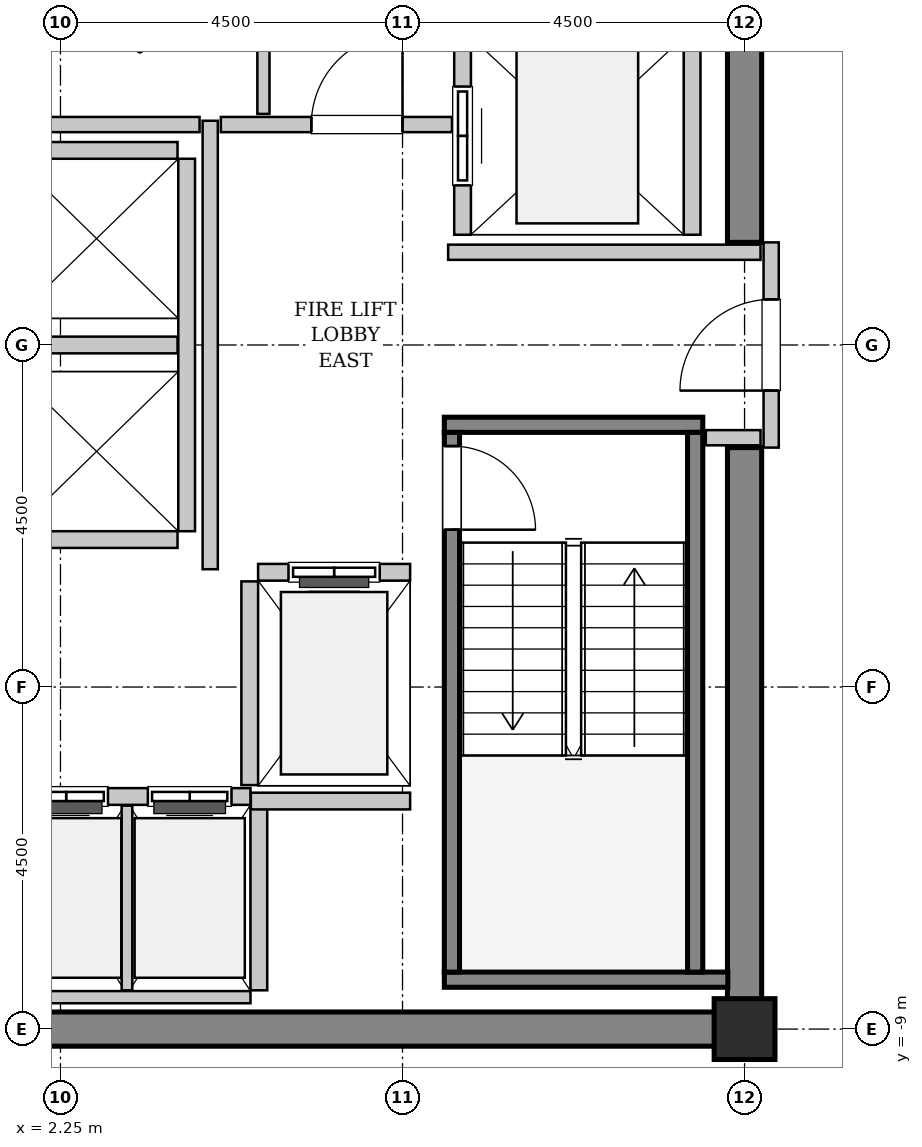
"""IFC4 building model, lengths in metres.
Left out: names, types, materials, properties, quantities, classifications, styles, units other than length and angle.
Written with IfcOpenShell. Run it as: python <this file> out.ifc"""

import sys

from ifc_helpers import new_model, si_unit, direction, frame, frame_2d, origin, origin_2d, place, context, subcontext, project, spatial, rectangle, hollow_rectangle, extrude, source, transform, mapped, element, fill, save


model = new_model("IFC4")
c1 = context("Model", 3, precision=1e-05, world=origin(), true_north=direction((0.0, 1.0)))
c2 = subcontext(c1, "Body", "Model", "MODEL_VIEW")
j1 = project(units=[si_unit("LENGTHUNIT", "METRE"), si_unit("PLANEANGLEUNIT", "RADIAN")], contexts=[c1])
p1 = place(None, origin())
s1 = spatial("IfcSite", under=j1, at=p1, CompositionType="ELEMENT")
p2 = place(p1, origin())
s2 = spatial("IfcBuilding", under=s1, at=p2, CompositionType="ELEMENT")
p3 = place(p2, frame((0.0, 0.0, 221.8)))
s3 = spatial("IfcBuildingStorey", under=s2, at=p3, CompositionType="ELEMENT", Elevation=221.8)
m1 = source(origin(), c2, "Body", "SweptSolid", [
    extrude(rectangle(XDim=9.925, YDim=0.45, at=frame_2d((4.962, 0.0))), origin(), (0.0, 0.0, 1.0), 3.8),
])
p4 = place(p3, frame((1.55, -9.0, 0.0), z_axis=(0.0, 0.0, 1.0), x_axis=(1.0, 0.0, 0.0)))
e1 = element("IfcWall", 1, at=p4, inside=s3, PredefinedType="SHEAR", context=c2, shape_type="MappedRepresentation", body=[
    mapped(m1, transform((0.0, 0.0, 0.0), x_axis=(1.0, 0.0, 0.0), y_axis=(0.0, 1.0, 0.0), z_axis=(0.0, 0.0, 1.0), scale=1.0)),
])
m2 = source(origin(), c2, "Body", "SweptSolid", [
    extrude(rectangle(XDim=7.425, YDim=0.45, at=frame_2d((3.712, 0.0))), origin(), (0.0, 0.0, 1.0), 3.8),
])
for number, where, z_axis, x_axis in (
    (2, (11.25, -8.775, 0.0), (0.0, 0.0, 1.0), (0.0, 1.0, 0.0)),
    (3, (11.25, 1.35, 0.0), (0.0, 0.0, 1.0), (0.0, 1.0, 0.0)),
):
    element("IfcWall", number, at=place(p3, frame(where, z_axis=z_axis, x_axis=x_axis)), inside=s3, PredefinedType="SHEAR", context=c2, shape_type="MappedRepresentation", body=[
        mapped(m2, transform((0.0, 0.0, 0.0), x_axis=(1.0, 0.0, 0.0), y_axis=(0.0, 1.0, 0.0), z_axis=(0.0, 0.0, 1.0), scale=1.0)),
    ])
m3 = source(origin(), c2, "Body", "SweptSolid", [
    extrude(hollow_rectangle(XDim=0.8, YDim=0.8, WallThickness=0.04, InnerFilletRadius=0.04, OuterFilletRadius=0.08, at=origin_2d()), origin(), (0.0, 0.0, 1.0), 3.8),
])
p5 = place(p3, frame((11.25, -9.0, 0.0), z_axis=(0.0, 0.0, 1.0), x_axis=(1.0, 0.0, 0.0)))
e4 = element("IfcColumn", 4, at=p5, inside=s3, PredefinedType="COLUMN", context=c2, shape_type="MappedRepresentation", body=[
    mapped(m3, transform((0.0, 0.0, 0.0), x_axis=(1.0, 0.0, 0.0), y_axis=(0.0, 1.0, 0.0), z_axis=(0.0, 0.0, 1.0), scale=1.0)),
])
m4 = source(origin(), c2, "Body", "SweptSolid", [
    extrude(rectangle(XDim=3.4, YDim=0.2, at=frame_2d((1.7, 0.0))), origin(), (0.0, 0.0, 1.0), 3.8),
])
p6 = place(p3, frame((7.3, -1.05, 0.0), z_axis=(0.0, 0.0, 1.0), x_axis=(1.0, 0.0, 0.0)))
e5 = element("IfcWall", 5, at=p6, inside=s3, PredefinedType="SOLIDWALL", context=c2, shape_type="MappedRepresentation", body=[
    mapped(m4, transform((0.0, 0.0, 0.0), x_axis=(1.0, 0.0, 0.0), y_axis=(0.0, 1.0, 0.0), z_axis=(0.0, 0.0, 1.0), scale=1.0)),
])
m5 = source(origin(), c2, "Body", "SweptSolid", [
    extrude(rectangle(XDim=3.73, YDim=0.2, at=frame_2d((1.865, 0.0))), origin(), (0.0, 0.0, 1.0), 3.8),
])
p7 = place(p3, frame((7.3, -8.35, 0.0), z_axis=(0.0, 0.0, 1.0), x_axis=(1.0, 0.0, 0.0)))
e6 = element("IfcWall", 6, at=p7, inside=s3, PredefinedType="SOLIDWALL", context=c2, shape_type="MappedRepresentation", body=[
    mapped(m5, transform((0.0, 0.0, 0.0), x_axis=(1.0, 0.0, 0.0), y_axis=(0.0, 1.0, 0.0), z_axis=(0.0, 0.0, 1.0), scale=1.0)),
])
m6 = source(origin(), c2, "Body", "SweptSolid", [
    extrude(rectangle(XDim=7.1, YDim=0.2, at=frame_2d((3.55, 0.0))), origin(), (0.0, 0.0, 1.0), 3.8),
])
p8 = place(p3, frame((7.4, -1.15, 0.0), z_axis=(0.0, 0.0, 1.0), x_axis=(0.0, -1.0, 0.0)))
e7 = element("IfcWall", 7, at=p8, inside=s3, PredefinedType="SOLIDWALL", context=c2, shape_type="MappedRepresentation", body=[
    mapped(m6, transform((0.0, 0.0, 0.0), x_axis=(1.0, 0.0, 0.0), y_axis=(0.0, 1.0, 0.0), z_axis=(0.0, 0.0, 1.0), scale=1.0)),
])
p9 = place(p8, frame((0.18, 0.0, 0.0)))
e8 = element("IfcOpeningElement", 8, at=p9, cuts=e7, PredefinedType="OPENING", context=c2, shape_type="SweptSolid", body=[
    extrude(rectangle(XDim=1.1, YDim=2.15, at=frame_2d((0.55, 1.075))), frame((0.0, 0.11, 0.0), z_axis=(0.0, -1.0, 0.0), x_axis=(1.0, 0.0, 0.0)), (0.0, 0.0, 1.0), 0.22),
])
p10 = place(p3, frame((10.6, -1.15, 0.0), z_axis=(0.0, 0.0, 1.0), x_axis=(0.0, -1.0, 0.0)))
e9 = element("IfcWall", 9, at=p10, inside=s3, PredefinedType="SOLIDWALL", context=c2, shape_type="MappedRepresentation", body=[
    mapped(m6, transform((0.0, 0.0, 0.0), x_axis=(1.0, 0.0, 0.0), y_axis=(0.0, 1.0, 0.0), z_axis=(0.0, 0.0, 1.0), scale=1.0)),
])
m7 = source(origin(), c2, "Body", "SweptSolid", [
    extrude(rectangle(XDim=2.0, YDim=0.22, at=frame_2d((1.0, 0.0))), origin(), (0.0, 0.0, 1.0), 3.535),
])
p11 = place(p3, frame((6.85, -2.99, 0.0), z_axis=(0.0, 0.0, 1.0), x_axis=(-1.0, 0.0, 0.0)))
e10 = element("IfcWall", 10, at=p11, inside=s3, PredefinedType="SOLIDWALL", context=c2, shape_type="MappedRepresentation", body=[
    mapped(m7, transform((0.0, 0.0, 0.0), x_axis=(1.0, 0.0, 0.0), y_axis=(0.0, 1.0, 0.0), z_axis=(0.0, 0.0, 1.0), scale=1.0)),
])
p12 = place(p11, frame((0.4, 0.0, 0.0)))
e11 = element("IfcOpeningElement", 11, at=p12, cuts=e10, PredefinedType="OPENING", context=c2, shape_type="SweptSolid", body=[
    extrude(rectangle(XDim=1.2, YDim=2.2, at=frame_2d((0.6, 1.1))), frame((0.0, 0.12, 0.0), z_axis=(0.0, -1.0, 0.0), x_axis=(1.0, 0.0, 0.0)), (0.0, 0.0, 1.0), 0.24),
])
m8 = source(origin(), c2, "Body", "SweptSolid", [
    extrude(rectangle(XDim=2.68, YDim=0.22, at=frame_2d((1.34, 0.0))), origin(), (0.0, 0.0, 1.0), 3.535),
])
p13 = place(p3, frame((4.74, -3.11, 0.0), z_axis=(0.0, 0.0, 1.0), x_axis=(0.0, -1.0, 0.0)))
e12 = element("IfcWall", 12, at=p13, inside=s3, PredefinedType="SOLIDWALL", context=c2, shape_type="MappedRepresentation", body=[
    mapped(m8, transform((0.0, 0.0, 0.0), x_axis=(1.0, 0.0, 0.0), y_axis=(0.0, 1.0, 0.0), z_axis=(0.0, 0.0, 1.0), scale=1.0)),
])
m9 = source(origin(), c2, "Body", "SweptSolid", [
    extrude(rectangle(XDim=5.45, YDim=0.22, at=frame_2d((2.725, 0.0))), origin(), (0.0, 0.0, 1.0), 3.535),
])
p14 = place(p3, frame((7.54, 6.9, 0.0), z_axis=(0.0, 0.0, 1.0), x_axis=(0.0, -1.0, 0.0)))
e13 = element("IfcWall", 13, at=p14, inside=s3, PredefinedType="SOLIDWALL", context=c2, shape_type="MappedRepresentation", body=[
    mapped(m9, transform((0.0, 0.0, 0.0), x_axis=(1.0, 0.0, 0.0), y_axis=(0.0, 1.0, 0.0), z_axis=(0.0, 0.0, 1.0), scale=1.0)),
])
p15 = place(p14, frame((3.5, 0.0, 0.0)))
e14 = element("IfcOpeningElement", 14, at=p15, cuts=e13, PredefinedType="OPENING", context=c2, shape_type="SweptSolid", body=[
    extrude(rectangle(XDim=1.3, YDim=2.3, at=frame_2d((0.65, 1.15))), frame((0.0, 0.12, 0.0), z_axis=(0.0, -1.0, 0.0), x_axis=(1.0, 0.0, 0.0)), (0.0, 0.0, 1.0), 0.24),
])
p16 = place(p14, frame((0.65, 0.0, 0.0)))
e15 = element("IfcOpeningElement", 15, at=p16, cuts=e13, PredefinedType="OPENING", context=c2, shape_type="SweptSolid", body=[
    extrude(rectangle(XDim=1.3, YDim=2.3, at=frame_2d((0.65, 1.15))), frame((0.0, 0.12, 0.0), z_axis=(0.0, -1.0, 0.0), x_axis=(1.0, 0.0, 0.0)), (0.0, 0.0, 1.0), 0.24),
])
p17 = place(p3, frame((10.56, 1.45, 0.0), z_axis=(0.0, 0.0, 1.0), x_axis=(0.0, 1.0, 0.0)))
e16 = element("IfcWall", 16, at=p17, inside=s3, PredefinedType="SOLIDWALL", context=c2, shape_type="MappedRepresentation", body=[
    mapped(m9, transform((0.0, 0.0, 0.0), x_axis=(1.0, 0.0, 0.0), y_axis=(0.0, 1.0, 0.0), z_axis=(0.0, 0.0, 1.0), scale=1.0)),
])
m10 = source(origin(), c2, "Body", "SweptSolid", [
    extrude(rectangle(XDim=3.2, YDim=0.22, at=frame_2d((1.6, 0.0))), origin(), (0.0, 0.0, 1.0), 3.535),
])
p18 = place(p3, frame((4.75, -5.94, 0.0), z_axis=(0.0, 0.0, 1.0), x_axis=(-1.0, 0.0, 0.0)))
e17 = element("IfcWall", 17, at=p18, inside=s3, PredefinedType="SOLIDWALL", context=c2, shape_type="MappedRepresentation", body=[
    mapped(m10, transform((0.0, 0.0, 0.0), x_axis=(1.0, 0.0, 0.0), y_axis=(0.0, 1.0, 0.0), z_axis=(0.0, 0.0, 1.0), scale=1.0)),
])
p19 = place(p18, frame((1.875, 0.0, 0.0)))
e18 = element("IfcOpeningElement", 18, at=p19, cuts=e17, PredefinedType="OPENING", context=c2, shape_type="SweptSolid", body=[
    extrude(rectangle(XDim=1.1, YDim=2.2, at=frame_2d((0.55, 1.1))), frame((0.0, 0.12, 0.0), z_axis=(0.0, -1.0, 0.0), x_axis=(1.0, 0.0, 0.0)), (0.0, 0.0, 1.0), 0.24),
])
p20 = place(p18, frame((0.25, 0.0, 0.0)))
e19 = element("IfcOpeningElement", 19, at=p20, cuts=e17, PredefinedType="OPENING", context=c2, shape_type="SweptSolid", body=[
    extrude(rectangle(XDim=1.1, YDim=2.2, at=frame_2d((0.55, 1.1))), frame((0.0, 0.12, 0.0), z_axis=(0.0, -1.0, 0.0), x_axis=(1.0, 0.0, 0.0)), (0.0, 0.0, 1.0), 0.24),
])
m11 = source(origin(), c2, "Body", "SweptSolid", [
    extrude(rectangle(XDim=3.2, YDim=0.16, at=frame_2d((1.6, 0.0))), origin(), (0.0, 0.0, 1.0), 2.625),
])
p21 = place(p3, frame((1.55, -8.58, 0.0), z_axis=(0.0, 0.0, 1.0), x_axis=(1.0, 0.0, 0.0)))
e20 = element("IfcWall", 20, at=p21, inside=s3, PredefinedType="PARTITIONING", context=c2, shape_type="MappedRepresentation", body=[
    mapped(m11, transform((0.0, 0.0, 0.0), x_axis=(1.0, 0.0, 0.0), y_axis=(0.0, 1.0, 0.0), z_axis=(0.0, 0.0, 1.0), scale=1.0)),
])
m12 = source(origin(), c2, "Body", "SweptSolid", [
    extrude(rectangle(XDim=2.43, YDim=0.14, at=frame_2d((1.215, 0.0))), origin(), (0.0, 0.0, 1.0), 3.535),
])
p22 = place(p3, frame((3.125, -8.49, 0.0), z_axis=(0.0, 0.0, 1.0), x_axis=(0.0, 1.0, 0.0)))
e21 = element("IfcWall", 21, at=p22, inside=s3, PredefinedType="PARTITIONING", context=c2, shape_type="MappedRepresentation", body=[
    mapped(m12, transform((0.0, 0.0, 0.0), x_axis=(1.0, 0.0, 0.0), y_axis=(0.0, 1.0, 0.0), z_axis=(0.0, 0.0, 1.0), scale=1.0)),
])
m13 = source(origin(), c2, "Body", "SweptSolid", [
    extrude(rectangle(XDim=2.43, YDim=0.22, at=frame_2d((1.215, 0.0))), origin(), (0.0, 0.0, 1.0), 3.535),
])
p23 = place(p3, frame((4.86, -8.49, 0.0), z_axis=(0.0, 0.0, 1.0), x_axis=(0.0, 1.0, 0.0)))
e22 = element("IfcWall", 22, at=p23, inside=s3, PredefinedType="SOLIDWALL", context=c2, shape_type="MappedRepresentation", body=[
    mapped(m13, transform((0.0, 0.0, 0.0), x_axis=(1.0, 0.0, 0.0), y_axis=(0.0, 1.0, 0.0), z_axis=(0.0, 0.0, 1.0), scale=1.0)),
])
m14 = source(origin(), c2, "Body", "SweptSolid", [
    extrude(rectangle(XDim=4.9, YDim=0.22, at=frame_2d((2.45, 0.0))), origin(), (0.0, 0.0, 1.0), 3.535),
])
p24 = place(p3, frame((3.91, -2.45, 0.0), z_axis=(0.0, 0.0, 1.0), x_axis=(0.0, 1.0, 0.0)))
e23 = element("IfcWall", 23, at=p24, inside=s3, PredefinedType="SOLIDWALL", context=c2, shape_type="MappedRepresentation", body=[
    mapped(m14, transform((0.0, 0.0, 0.0), x_axis=(1.0, 0.0, 0.0), y_axis=(0.0, 1.0, 0.0), z_axis=(0.0, 0.0, 1.0), scale=1.0)),
])
m15 = source(origin(), c2, "Body", "SweptSolid", [
    extrude(rectangle(XDim=2.13, YDim=0.22, at=frame_2d((1.065, 0.0))), origin(), (0.0, 0.0, 1.0), 3.535),
])
for number, where, z_axis, x_axis in (
    (24, (1.66, -2.56, 0.0), (0.0, 0.0, 1.0), (1.0, 0.0, 0.0)),
    (25, (1.66, 0.0, 0.0), (0.0, 0.0, 1.0), (1.0, 0.0, 0.0)),
    (26, (3.79, 2.56, 0.0), (0.0, 0.0, 1.0), (-1.0, 0.0, 0.0)),
):
    element("IfcWall", number, at=place(p3, frame(where, z_axis=z_axis, x_axis=x_axis)), inside=s3, PredefinedType="SOLIDWALL", context=c2, shape_type="MappedRepresentation", body=[
        mapped(m15, transform((0.0, 0.0, 0.0), x_axis=(1.0, 0.0, 0.0), y_axis=(0.0, 1.0, 0.0), z_axis=(0.0, 0.0, 1.0), scale=1.0)),
    ])
m16 = source(origin(), c2, "Body", "SweptSolid", [
    extrude(rectangle(XDim=2.095, YDim=0.22, at=frame_2d((1.048, 0.0))), origin(), (0.0, 0.0, 1.0), 3.535),
])
p25 = place(p3, frame((4.755, -6.0, 0.0), z_axis=(0.0, 0.0, 1.0), x_axis=(1.0, 0.0, 0.0)))
e27 = element("IfcWall", 27, at=p25, inside=s3, PredefinedType="SOLIDWALL", context=c2, shape_type="MappedRepresentation", body=[
    mapped(m16, transform((0.0, 0.0, 0.0), x_axis=(1.0, 0.0, 0.0), y_axis=(0.0, 1.0, 0.0), z_axis=(0.0, 0.0, 1.0), scale=1.0)),
])
m17 = source(origin(), c2, "Body", "SweptSolid", [
    extrude(rectangle(XDim=2.7, YDim=0.2, at=frame_2d((1.35, 0.0))), origin(), (0.0, 0.0, 1.0), 2.625),
])
p26 = place(p3, frame((11.6, -1.35, 0.0), z_axis=(0.0, 0.0, 1.0), x_axis=(0.0, 1.0, 0.0)))
e28 = element("IfcWall", 28, at=p26, inside=s3, PredefinedType="PARTITIONING", context=c2, shape_type="MappedRepresentation", body=[
    mapped(m17, transform((0.0, 0.0, 0.0), x_axis=(1.0, 0.0, 0.0), y_axis=(0.0, 1.0, 0.0), z_axis=(0.0, 0.0, 1.0), scale=1.0)),
])
p27 = place(p26, frame((0.75, 0.0, 0.0)))
e29 = element("IfcOpeningElement", 29, at=p27, cuts=e28, PredefinedType="OPENING", context=c2, shape_type="SweptSolid", body=[
    extrude(rectangle(XDim=1.2, YDim=2.15, at=frame_2d((0.6, 1.075))), frame((0.0, 0.11, 0.0), z_axis=(0.0, -1.0, 0.0), x_axis=(1.0, 0.0, 0.0)), (0.0, 0.0, 1.0), 0.22),
])
m18 = source(origin(), c2, "Body", "SweptSolid", [
    extrude(rectangle(XDim=5.9, YDim=0.2, at=frame_2d((2.95, 0.0))), origin(), (0.0, 0.0, 1.0), 3.535),
])
p28 = place(p3, frame((4.22, -2.95, 0.0), z_axis=(0.0, 0.0, 1.0), x_axis=(0.0, 1.0, 0.0)))
e30 = element("IfcWall", 30, at=p28, inside=s3, PredefinedType="PARTITIONING", context=c2, shape_type="MappedRepresentation", body=[
    mapped(m18, transform((0.0, 0.0, 0.0), x_axis=(1.0, 0.0, 0.0), y_axis=(0.0, 1.0, 0.0), z_axis=(0.0, 0.0, 1.0), scale=1.0)),
])
m19 = source(origin(), c2, "Body", "SweptSolid", [
    extrude(rectangle(XDim=2.52, YDim=0.2, at=frame_2d((1.26, 0.0))), origin(), (0.0, 0.0, 1.0), 3.535),
])
p29 = place(p3, frame((1.56, 2.9, 0.0), z_axis=(0.0, 0.0, 1.0), x_axis=(1.0, 0.0, 0.0)))
e31 = element("IfcWall", 31, at=p29, inside=s3, PredefinedType="PARTITIONING", context=c2, shape_type="MappedRepresentation", body=[
    mapped(m19, transform((0.0, 0.0, 0.0), x_axis=(1.0, 0.0, 0.0), y_axis=(0.0, 1.0, 0.0), z_axis=(0.0, 0.0, 1.0), scale=1.0)),
])
m20 = source(origin(), c2, "Body", "SweptSolid", [
    extrude(rectangle(XDim=3.04, YDim=0.2, at=frame_2d((1.52, 0.0))), origin(), (0.0, 0.0, 1.0), 3.535),
])
p30 = place(p3, frame((4.36, 2.9, 0.0), z_axis=(0.0, 0.0, 1.0), x_axis=(1.0, 0.0, 0.0)))
e32 = element("IfcWall", 32, at=p30, inside=s3, PredefinedType="PARTITIONING", context=c2, shape_type="MappedRepresentation", body=[
    mapped(m20, transform((0.0, 0.0, 0.0), x_axis=(1.0, 0.0, 0.0), y_axis=(0.0, 1.0, 0.0), z_axis=(0.0, 0.0, 1.0), scale=1.0)),
])
p31 = place(p30, frame((1.19, 0.0, 0.0)))
e33 = element("IfcOpeningElement", 33, at=p31, cuts=e32, PredefinedType="OPENING", context=c2, shape_type="SweptSolid", body=[
    extrude(rectangle(XDim=1.2, YDim=2.15, at=frame_2d((0.6, 1.075))), frame((0.0, 0.11, 0.0), z_axis=(0.0, -1.0, 0.0), x_axis=(1.0, 0.0, 0.0)), (0.0, 0.0, 1.0), 0.22),
])
m21 = source(origin(), c2, "Body", "SweptSolid", [
    extrude(rectangle(XDim=4.11, YDim=0.2, at=frame_2d((2.055, 0.0))), origin(), (0.0, 0.0, 1.0), 3.535),
])
p32 = place(p3, frame((7.35, 1.22, 0.0), z_axis=(0.0, 0.0, 1.0), x_axis=(1.0, 0.0, 0.0)))
e34 = element("IfcWall", 34, at=p32, inside=s3, PredefinedType="PARTITIONING", context=c2, shape_type="MappedRepresentation", body=[
    mapped(m21, transform((0.0, 0.0, 0.0), x_axis=(1.0, 0.0, 0.0), y_axis=(0.0, 1.0, 0.0), z_axis=(0.0, 0.0, 1.0), scale=1.0)),
])
m22 = source(origin(), c2, "Body", "SweptSolid", [
    extrude(rectangle(XDim=0.72, YDim=0.2, at=frame_2d((0.36, 0.0))), origin(), (0.0, 0.0, 1.0), 3.535),
])
p33 = place(p3, frame((10.74, -1.22, 0.0), z_axis=(0.0, 0.0, 1.0), x_axis=(1.0, 0.0, 0.0)))
e35 = element("IfcWall", 35, at=p33, inside=s3, PredefinedType="PARTITIONING", context=c2, shape_type="MappedRepresentation", body=[
    mapped(m22, transform((0.0, 0.0, 0.0), x_axis=(1.0, 0.0, 0.0), y_axis=(0.0, 1.0, 0.0), z_axis=(0.0, 0.0, 1.0), scale=1.0)),
])
m23 = source(origin(), c2, "Body", "SweptSolid", [
    extrude(rectangle(XDim=5.45, YDim=0.16, at=frame_2d((2.725, 0.0))), origin(), (0.0, 0.0, 1.0), 3.535),
])
p34 = place(p3, frame((4.92, 3.04, 0.0), z_axis=(0.0, 0.0, 1.0), x_axis=(0.0, 1.0, 0.0)))
e36 = element("IfcWall", 36, at=p34, inside=s3, PredefinedType="PARTITIONING", context=c2, shape_type="MappedRepresentation", body=[
    mapped(m23, transform((0.0, 0.0, 0.0), x_axis=(1.0, 0.0, 0.0), y_axis=(0.0, 1.0, 0.0), z_axis=(0.0, 0.0, 1.0), scale=1.0)),
])
m24 = source(origin(), c2, "Body", "SweptSolid", [
    extrude(rectangle(XDim=1.1, YDim=2.15, at=frame_2d((0.55, 1.075))), frame((0.0, 0.025, 0.0), z_axis=(0.0, -1.0, 0.0), x_axis=(1.0, 0.0, 0.0)), (0.0, 0.0, 1.0), 0.05),
])
p35 = place(p9, origin())
e37 = element("IfcDoor", 37, at=p35, inside=s3, OperationType="SINGLE_SWING_RIGHT", PredefinedType="DOOR", context=c2, shape_type="MappedRepresentation", body=[
    mapped(m24, transform((0.0, 0.0, 0.0), x_axis=(1.0, 0.0, 0.0), y_axis=(0.0, 1.0, 0.0), z_axis=(0.0, 0.0, 1.0), scale=1.0)),
])
fill(e8, e37)
m25 = source(origin(), c2, "Body", "SweptSolid", [
    extrude(rectangle(XDim=1.2, YDim=2.2, at=frame_2d((0.6, 1.1))), frame((0.0, 0.025, 0.0), z_axis=(0.0, -1.0, 0.0), x_axis=(1.0, 0.0, 0.0)), (0.0, 0.0, 1.0), 0.05),
])
p36 = place(p12, origin())
e38 = element("IfcDoor", 38, at=p36, inside=s3, OperationType="SLIDING_TO_LEFT", PredefinedType="DOOR", context=c2, shape_type="MappedRepresentation", body=[
    mapped(m25, transform((0.0, 0.0, 0.0), x_axis=(1.0, 0.0, 0.0), y_axis=(0.0, 1.0, 0.0), z_axis=(0.0, 0.0, 1.0), scale=1.0)),
])
fill(e11, e38)
m26 = source(origin(), c2, "Body", "SweptSolid", [
    extrude(rectangle(XDim=1.3, YDim=2.3, at=frame_2d((0.65, 1.15))), frame((0.0, 0.025, 0.0), z_axis=(0.0, -1.0, 0.0), x_axis=(1.0, 0.0, 0.0)), (0.0, 0.0, 1.0), 0.05),
])
p37 = place(p15, origin())
e39 = element("IfcDoor", 39, at=p37, inside=s3, OperationType="SLIDING_TO_RIGHT", PredefinedType="DOOR", context=c2, shape_type="MappedRepresentation", body=[
    mapped(m26, transform((0.0, 0.0, 0.0), x_axis=(1.0, 0.0, 0.0), y_axis=(0.0, 1.0, 0.0), z_axis=(0.0, 0.0, 1.0), scale=1.0)),
])
fill(e14, e39)
m27 = source(origin(), c2, "Body", "SweptSolid", [
    extrude(rectangle(XDim=1.1, YDim=2.2, at=frame_2d((0.55, 1.1))), frame((0.0, 0.025, 0.0), z_axis=(0.0, -1.0, 0.0), x_axis=(1.0, 0.0, 0.0)), (0.0, 0.0, 1.0), 0.05),
])
p38 = place(p19, origin())
e40 = element("IfcDoor", 40, at=p38, inside=s3, OperationType="DOUBLE_DOOR_SLIDING", PredefinedType="DOOR", context=c2, shape_type="MappedRepresentation", body=[
    mapped(m27, transform((0.0, 0.0, 0.0), x_axis=(1.0, 0.0, 0.0), y_axis=(0.0, 1.0, 0.0), z_axis=(0.0, 0.0, 1.0), scale=1.0)),
])
fill(e18, e40)
p39 = place(p20, origin())
e41 = element("IfcDoor", 41, at=p39, inside=s3, OperationType="DOUBLE_DOOR_SLIDING", PredefinedType="DOOR", context=c2, shape_type="MappedRepresentation", body=[
    mapped(m27, transform((0.0, 0.0, 0.0), x_axis=(1.0, 0.0, 0.0), y_axis=(0.0, 1.0, 0.0), z_axis=(0.0, 0.0, 1.0), scale=1.0)),
])
fill(e19, e41)
m28 = source(origin(), c2, "Body", "SweptSolid", [
    extrude(rectangle(XDim=1.2, YDim=2.15, at=frame_2d((0.6, 1.075))), frame((0.0, 0.025, 0.0), z_axis=(0.0, -1.0, 0.0), x_axis=(1.0, 0.0, 0.0)), (0.0, 0.0, 1.0), 0.05),
])
p40 = place(p27, origin())
e42 = element("IfcDoor", 42, at=p40, inside=s3, OperationType="SINGLE_SWING_LEFT", PredefinedType="DOOR", context=c2, shape_type="MappedRepresentation", body=[
    mapped(m28, transform((0.0, 0.0, 0.0), x_axis=(1.0, 0.0, 0.0), y_axis=(0.0, 1.0, 0.0), z_axis=(0.0, 0.0, 1.0), scale=1.0)),
])
fill(e29, e42)
p41 = place(p31, origin())
e43 = element("IfcDoor", 43, at=p41, inside=s3, OperationType="SINGLE_SWING_RIGHT", PredefinedType="DOOR", context=c2, shape_type="MappedRepresentation", body=[
    mapped(m28, transform((0.0, 0.0, 0.0), x_axis=(1.0, 0.0, 0.0), y_axis=(0.0, 1.0, 0.0), z_axis=(0.0, 0.0, 1.0), scale=1.0)),
])
fill(e33, e43)
save(model, sys.argv[1])
